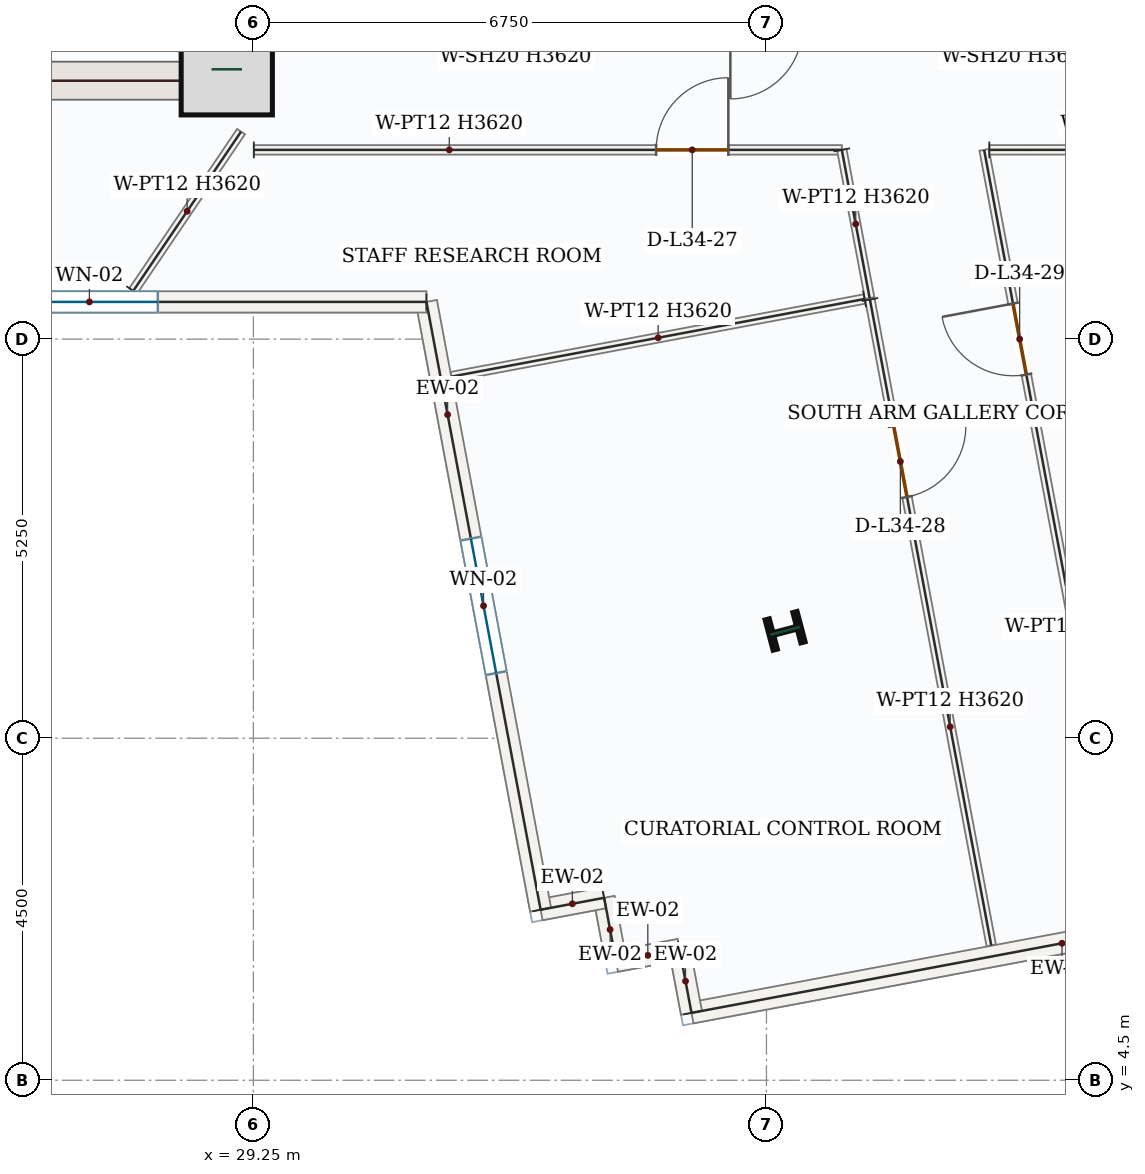
"""IFC4 building model, lengths in metres.
Left out: names, types, materials, properties, quantities, classifications, styles, units other than length and angle.
Written with IfcOpenShell. Run it as: python <this file> out.ifc"""

import sys

from ifc_helpers import new_model, si_unit, direction, frame, frame_2d, origin, origin_2d, place, context, subcontext, project, spatial, rectangle, i_section, extrude, source, transform, mapped, element, fill, save


model = new_model("IFC4")
c1 = context("Model", 3, precision=1e-05, world=origin(), true_north=direction((0.0, 1.0)))
c2 = subcontext(c1, "Body", "Model", "MODEL_VIEW")
j1 = project(units=[si_unit("LENGTHUNIT", "METRE"), si_unit("PLANEANGLEUNIT", "RADIAN")], contexts=[c1])
p1 = place(None, origin())
s1 = spatial("IfcSite", under=j1, at=p1, CompositionType="ELEMENT")
p2 = place(p1, origin())
s2 = spatial("IfcBuilding", under=s1, at=p2, CompositionType="ELEMENT")
p3 = place(p2, frame((0.0, 0.0, 151.2)))
s3 = spatial("IfcBuildingStorey", under=s2, at=p3, CompositionType="ELEMENT", Elevation=151.2)
p4 = place(p3, frame((29.0, 17.4, 0.0), z_axis=(0.0, 0.0, 1.0), x_axis=(0.0, 1.0, 0.0)))
e1 = element("IfcWall", 1, at=p4, inside=s3, PredefinedType="SHEAR", context=c2, shape_type="SweptSolid", body=[
    extrude(rectangle(XDim=8.55, YDim=0.5, at=frame_2d((4.275, 0.0))), origin(), (0.0, 0.0, 1.0), 3.62),
])
p5 = place(p4, frame((6.65, 0.0, 0.0)))
e2 = element("IfcOpeningElement", 2, at=p5, cuts=e1, PredefinedType="OPENING", context=c2, shape_type="SweptSolid", body=[
    extrude(rectangle(XDim=1.1, YDim=2.2, at=frame_2d((0.55, 1.1))), frame((0.0, 0.26, 0.0), z_axis=(0.0, -1.0, 0.0), x_axis=(1.0, 0.0, 0.0)), (0.0, 0.0, 1.0), 0.52),
])
p6 = place(p4, frame((3.15, 0.0, 0.0)))
e3 = element("IfcOpeningElement", 3, at=p6, cuts=e1, PredefinedType="OPENING", context=c2, shape_type="SweptSolid", body=[
    extrude(rectangle(XDim=0.88, YDim=2.1, at=frame_2d((0.44, 1.05))), frame((0.0, 0.26, 0.0), z_axis=(0.0, -1.0, 0.0), x_axis=(1.0, 0.0, 0.0)), (0.0, 0.0, 1.0), 0.52),
])
m1 = source(origin(), c2, "Body", "SweptSolid", [
    extrude(rectangle(XDim=7.0, YDim=0.5, at=frame_2d((3.5, 0.0))), origin(), (0.0, 0.0, 1.0), 3.62),
])
p7 = place(p3, frame((21.75, 17.65, 0.0), z_axis=(0.0, 0.0, 1.0), x_axis=(1.0, 0.0, 0.0)))
e4 = element("IfcWall", 4, at=p7, inside=s3, PredefinedType="SHEAR", context=c2, shape_type="MappedRepresentation", body=[
    mapped(m1, transform((0.0, 0.0, 0.0), x_axis=(1.0, 0.0, 0.0), y_axis=(0.0, 1.0, 0.0), z_axis=(0.0, 0.0, 1.0), scale=1.0)),
])
m2 = source(origin(), c2, "Body", "SweptSolid", [
    extrude(rectangle(XDim=1.2, YDim=1.2, at=origin_2d()), origin(), (0.0, 0.0, 1.0), 3.9),
])
p8 = place(p3, frame((28.9, 17.8, 0.0), z_axis=(0.0, 0.0, 1.0), x_axis=(1.0, 0.0, 0.0)))
e5 = element("IfcColumn", 5, at=p8, inside=s3, PredefinedType="COLUMN", context=c2, shape_type="MappedRepresentation", body=[
    mapped(m2, transform((0.0, 0.0, 0.0), x_axis=(1.0, 0.0, 0.0), y_axis=(0.0, 1.0, 0.0), z_axis=(0.0, 0.0, 1.0), scale=1.0)),
])
m3 = source(origin(), c2, "Body", "SweptSolid", [
    extrude(i_section(OverallWidth=0.412, OverallDepth=0.435, WebThickness=0.036, FlangeThickness=0.057, FilletRadius=0.018, at=origin_2d()), origin(), (0.0, 0.0, 1.0), 3.9),
])
p9 = place(p3, frame((36.245, 10.412, 0.0), z_axis=(0.0, 0.0, 1.0), x_axis=(-0.255445757936, 0.966823388604, 0.0)))
e6 = element("IfcColumn", 6, at=p9, inside=s3, PredefinedType="COLUMN", context=c2, shape_type="MappedRepresentation", body=[
    mapped(m3, transform((0.0, 0.0, 0.0), x_axis=(1.0, 0.0, 0.0), y_axis=(0.0, 1.0, 0.0), z_axis=(0.0, 0.0, 1.0), scale=1.0)),
])
m4 = source(origin(), c2, "Body", "SweptSolid", [
    extrude(rectangle(XDim=9.92, YDim=0.28, at=frame_2d((4.96, 0.0))), origin(), (0.0, 0.0, 1.0), 3.62),
])
p10 = place(p3, frame((44.763, 7.218, 0.0), z_axis=(0.0, 0.0, 1.0), x_axis=(-0.982807207568, -0.184634754994, 0.0)))
e7 = element("IfcWall", 7, at=p10, inside=s3, PredefinedType="SOLIDWALL", context=c2, shape_type="MappedRepresentation", body=[
    mapped(m4, transform((0.0, 0.0, 0.0), x_axis=(1.0, 0.0, 0.0), y_axis=(0.0, 1.0, 0.0), z_axis=(0.0, 0.0, 1.0), scale=1.0)),
])
m5 = source(origin(), c2, "Body", "SweptSolid", [
    extrude(rectangle(XDim=0.85, YDim=0.28, at=frame_2d((0.425, 0.0))), origin(), (0.0, 0.0, 1.0), 3.62),
])
for number, where, z_axis, x_axis in (
    (8, (35.014, 5.386, 0.0), (0.0, 0.0, 1.0), (-0.185, 0.983, 0.0)),
    (9, (34.857, 6.222, 0.0), (0.0, 0.0, 1.0), (-0.983, -0.185, 0.0)),
    (10, (34.021, 6.065, 0.0), (0.0, 0.0, 1.0), (-0.185, 0.983, 0.0)),
    (11, (33.865, 6.9, 0.0), (0.0, 0.0, 1.0), (-0.983, -0.185, 0.0)),
):
    element("IfcWall", number, at=place(p3, frame(where, z_axis=z_axis, x_axis=x_axis)), inside=s3, PredefinedType="SOLIDWALL", context=c2, shape_type="MappedRepresentation", body=[
        mapped(m5, transform((0.0, 0.0, 0.0), x_axis=(1.0, 0.0, 0.0), y_axis=(0.0, 1.0, 0.0), z_axis=(0.0, 0.0, 1.0), scale=1.0)),
    ])
p11 = place(p3, frame((33.029, 6.743, 0.0), z_axis=(0.0, 0.0, 1.0), x_axis=(-0.184649032166, 0.982804525285, 0.0)))
e12 = element("IfcWall", 12, at=p11, inside=s3, PredefinedType="SOLIDWALL", context=c2, shape_type="SweptSolid", body=[
    extrude(rectangle(XDim=8.137, YDim=0.28, at=frame_2d((4.068, 0.0))), origin(), (0.0, 0.0, 1.0), 3.62),
])
p12 = place(p11, frame((3.168, 0.0, 0.85)))
e13 = element("IfcOpeningElement", 13, at=p12, cuts=e12, PredefinedType="OPENING", context=c2, shape_type="SweptSolid", body=[
    extrude(rectangle(XDim=1.8, YDim=1.75, at=frame_2d((0.9, 0.875))), frame((0.0, 0.15, 0.0), z_axis=(0.0, -1.0, 0.0), x_axis=(1.0, 0.0, 0.0)), (0.0, 0.0, 1.0), 0.3),
])
p13 = place(p3, frame((31.527, 14.74, 0.0), z_axis=(0.0, 0.0, 1.0), x_axis=(-1.0, 0.0, 0.0)))
e14 = element("IfcWall", 14, at=p13, inside=s3, PredefinedType="SOLIDWALL", context=c2, shape_type="SweptSolid", body=[
    extrude(rectangle(XDim=8.869, YDim=0.28, at=frame_2d((4.434, 0.0))), origin(), (0.0, 0.0, 1.0), 3.62),
])
p14 = place(p13, frame((3.534, 0.0, 0.85)))
e15 = element("IfcOpeningElement", 15, at=p14, cuts=e14, PredefinedType="OPENING", context=c2, shape_type="SweptSolid", body=[
    extrude(rectangle(XDim=1.8, YDim=1.75, at=frame_2d((0.9, 0.875))), frame((0.0, 0.15, 0.0), z_axis=(0.0, -1.0, 0.0), x_axis=(1.0, 0.0, 0.0)), (0.0, 0.0, 1.0), 0.3),
])
p15 = place(p3, frame((29.256, 16.74, 0.0), z_axis=(0.0, 0.0, 1.0), x_axis=(1.0, 0.0, 0.0)))
e16 = element("IfcWall", 16, at=p15, inside=s3, PredefinedType="PARTITIONING", context=c2, shape_type="SweptSolid", body=[
    extrude(rectangle(XDim=7.736, YDim=0.125, at=frame_2d((3.868, 0.0))), origin(), (0.0, 0.0, 1.0), 3.62),
])
p16 = place(p15, frame((5.293, 0.0, 0.0)))
e17 = element("IfcOpeningElement", 17, at=p16, cuts=e16, PredefinedType="OPENING", context=c2, shape_type="SweptSolid", body=[
    extrude(rectangle(XDim=0.95, YDim=2.15, at=frame_2d((0.475, 1.075))), frame((0.0, 0.073, 0.0), z_axis=(0.0, -1.0, 0.0), x_axis=(1.0, 0.0, 0.0)), (0.0, 0.0, 1.0), 0.145),
])
m6 = source(origin(), c2, "Body", "SweptSolid", [
    extrude(rectangle(XDim=1.983, YDim=0.125, at=frame_2d((0.992, 0.0))), origin(), (0.0, 0.0, 1.0), 3.62),
])
p17 = place(p3, frame((36.991, 16.74, 0.0), z_axis=(0.0, 0.0, 1.0), x_axis=(0.184645271511, -0.982805231828, 0.0)))
e18 = element("IfcWall", 18, at=p17, inside=s3, PredefinedType="PARTITIONING", context=c2, shape_type="MappedRepresentation", body=[
    mapped(m6, transform((0.0, 0.0, 0.0), x_axis=(1.0, 0.0, 0.0), y_axis=(0.0, 1.0, 0.0), z_axis=(0.0, 0.0, 1.0), scale=1.0)),
])
m7 = source(origin(), c2, "Body", "SweptSolid", [
    extrude(rectangle(XDim=5.527, YDim=0.125, at=frame_2d((2.764, 0.0))), origin(), (0.0, 0.0, 1.0), 3.62),
])
p18 = place(p3, frame((37.291, 14.778, 0.0), z_axis=(0.0, 0.0, 1.0), x_axis=(-0.982808624954, -0.184627210117, 0.0)))
e19 = element("IfcWall", 19, at=p18, inside=s3, PredefinedType="PARTITIONING", context=c2, shape_type="MappedRepresentation", body=[
    mapped(m7, transform((0.0, 0.0, 0.0), x_axis=(1.0, 0.0, 0.0), y_axis=(0.0, 1.0, 0.0), z_axis=(0.0, 0.0, 1.0), scale=1.0)),
])
m8 = source(origin(), c2, "Body", "SweptSolid", [
    extrude(rectangle(XDim=2.53, YDim=0.125, at=frame_2d((1.265, 0.0))), origin(), (0.0, 0.0, 1.0), 3.62),
])
p19 = place(p3, frame((27.67, 14.885, 0.0), z_axis=(0.0, 0.0, 1.0), x_axis=(0.560455418396, 0.82818459536, 0.0)))
e20 = element("IfcWall", 20, at=p19, inside=s3, PredefinedType="PARTITIONING", context=c2, shape_type="MappedRepresentation", body=[
    mapped(m8, transform((0.0, 0.0, 0.0), x_axis=(1.0, 0.0, 0.0), y_axis=(0.0, 1.0, 0.0), z_axis=(0.0, 0.0, 1.0), scale=1.0)),
])
p20 = place(p3, frame((37.361, 14.771, 0.0), z_axis=(0.0, 0.0, 1.0), x_axis=(0.18463806937, -0.982806584908, 0.0)))
e21 = element("IfcWall", 21, at=p20, inside=s3, PredefinedType="PARTITIONING", context=c2, shape_type="SweptSolid", body=[
    extrude(rectangle(XDim=8.645, YDim=0.125, at=frame_2d((4.323, 0.0))), origin(), (0.0, 0.0, 1.0), 3.62),
])
p21 = place(p20, frame((1.693, 0.0, 0.0)))
e22 = element("IfcOpeningElement", 22, at=p21, cuts=e21, PredefinedType="OPENING", context=c2, shape_type="SweptSolid", body=[
    extrude(rectangle(XDim=0.95, YDim=2.15, at=frame_2d((0.475, 1.075))), frame((0.0, 0.073, 0.0), z_axis=(0.0, -1.0, 0.0), x_axis=(1.0, 0.0, 0.0)), (0.0, 0.0, 1.0), 0.145),
])
p22 = place(p3, frame((40.766, 6.615, 0.0), z_axis=(0.0, 0.0, 1.0), x_axis=(-0.184646211839, 0.982805055163, 0.0)))
e23 = element("IfcWall", 23, at=p22, inside=s3, PredefinedType="PARTITIONING", context=c2, shape_type="SweptSolid", body=[
    extrude(rectangle(XDim=10.303, YDim=0.125, at=frame_2d((5.151, 0.0))), origin(), (0.0, 0.0, 1.0), 3.62),
])
p23 = place(p22, frame((7.295, 0.0, 0.0)))
e24 = element("IfcOpeningElement", 24, at=p23, cuts=e23, PredefinedType="OPENING", context=c2, shape_type="SweptSolid", body=[
    extrude(rectangle(XDim=0.95, YDim=2.15, at=frame_2d((0.475, 1.075))), frame((0.0, 0.073, 0.0), z_axis=(0.0, -1.0, 0.0), x_axis=(1.0, 0.0, 0.0)), (0.0, 0.0, 1.0), 0.145),
])
m9 = source(origin(), c2, "Body", "SweptSolid", [
    extrude(rectangle(XDim=3.814, YDim=0.125, at=frame_2d((1.907, 0.0))), origin(), (0.0, 0.0, 1.0), 3.149),
])
p24 = place(p3, frame((38.932, 16.74, 0.0), z_axis=(0.0, 0.0, 1.0), x_axis=(0.999999948787, 0.000320040949, 0.0)))
e25 = element("IfcWall", 25, at=p24, inside=s3, PredefinedType="PARTITIONING", context=c2, shape_type="MappedRepresentation", body=[
    mapped(m9, transform((0.0, 0.0, 0.0), x_axis=(1.0, 0.0, 0.0), y_axis=(0.0, 1.0, 0.0), z_axis=(0.0, 0.0, 1.0), scale=1.0)),
])
m10 = source(origin(), c2, "Body", "SweptSolid", [
    extrude(rectangle(XDim=1.8, YDim=1.75, at=frame_2d((0.9, 0.875))), frame((0.0, 0.03, 0.0), z_axis=(0.0, -1.0, 0.0), x_axis=(1.0, 0.0, 0.0)), (0.0, 0.0, 1.0), 0.06),
])
p25 = place(p12, origin())
e26 = element("IfcWindow", 26, at=p25, inside=s3, PartitioningType="DOUBLE_PANEL_VERTICAL", PredefinedType="WINDOW", context=c2, shape_type="MappedRepresentation", body=[
    mapped(m10, transform((0.0, 0.0, 0.0), x_axis=(1.0, 0.0, 0.0), y_axis=(0.0, 1.0, 0.0), z_axis=(0.0, 0.0, 1.0), scale=1.0)),
])
fill(e13, e26)
p26 = place(p14, origin())
e27 = element("IfcWindow", 27, at=p26, inside=s3, PartitioningType="DOUBLE_PANEL_VERTICAL", PredefinedType="WINDOW", context=c2, shape_type="MappedRepresentation", body=[
    mapped(m10, transform((0.0, 0.0, 0.0), x_axis=(1.0, 0.0, 0.0), y_axis=(0.0, 1.0, 0.0), z_axis=(0.0, 0.0, 1.0), scale=1.0)),
])
fill(e15, e27)
m11 = source(origin(), c2, "Body", "SweptSolid", [
    extrude(rectangle(XDim=0.95, YDim=2.15, at=frame_2d((0.475, 1.075))), frame((0.0, 0.025, 0.0), z_axis=(0.0, -1.0, 0.0), x_axis=(1.0, 0.0, 0.0)), (0.0, 0.0, 1.0), 0.05),
])
p27 = place(p16, origin())
e28 = element("IfcDoor", 28, at=p27, inside=s3, OperationType="SINGLE_SWING_RIGHT", PredefinedType="DOOR", context=c2, shape_type="MappedRepresentation", body=[
    mapped(m11, transform((0.0, 0.0, 0.0), x_axis=(1.0, 0.0, 0.0), y_axis=(0.0, 1.0, 0.0), z_axis=(0.0, 0.0, 1.0), scale=1.0)),
])
fill(e17, e28)
p28 = place(p21, origin())
e29 = element("IfcDoor", 29, at=p28, inside=s3, OperationType="SINGLE_SWING_LEFT", PredefinedType="DOOR", context=c2, shape_type="MappedRepresentation", body=[
    mapped(m11, transform((0.0, 0.0, 0.0), x_axis=(1.0, 0.0, 0.0), y_axis=(0.0, 1.0, 0.0), z_axis=(0.0, 0.0, 1.0), scale=1.0)),
])
fill(e22, e29)
p29 = place(p23, origin())
e30 = element("IfcDoor", 30, at=p29, inside=s3, OperationType="SINGLE_SWING_RIGHT", PredefinedType="DOOR", context=c2, shape_type="MappedRepresentation", body=[
    mapped(m11, transform((0.0, 0.0, 0.0), x_axis=(1.0, 0.0, 0.0), y_axis=(0.0, 1.0, 0.0), z_axis=(0.0, 0.0, 1.0), scale=1.0)),
])
fill(e24, e30)
save(model, sys.argv[1])
